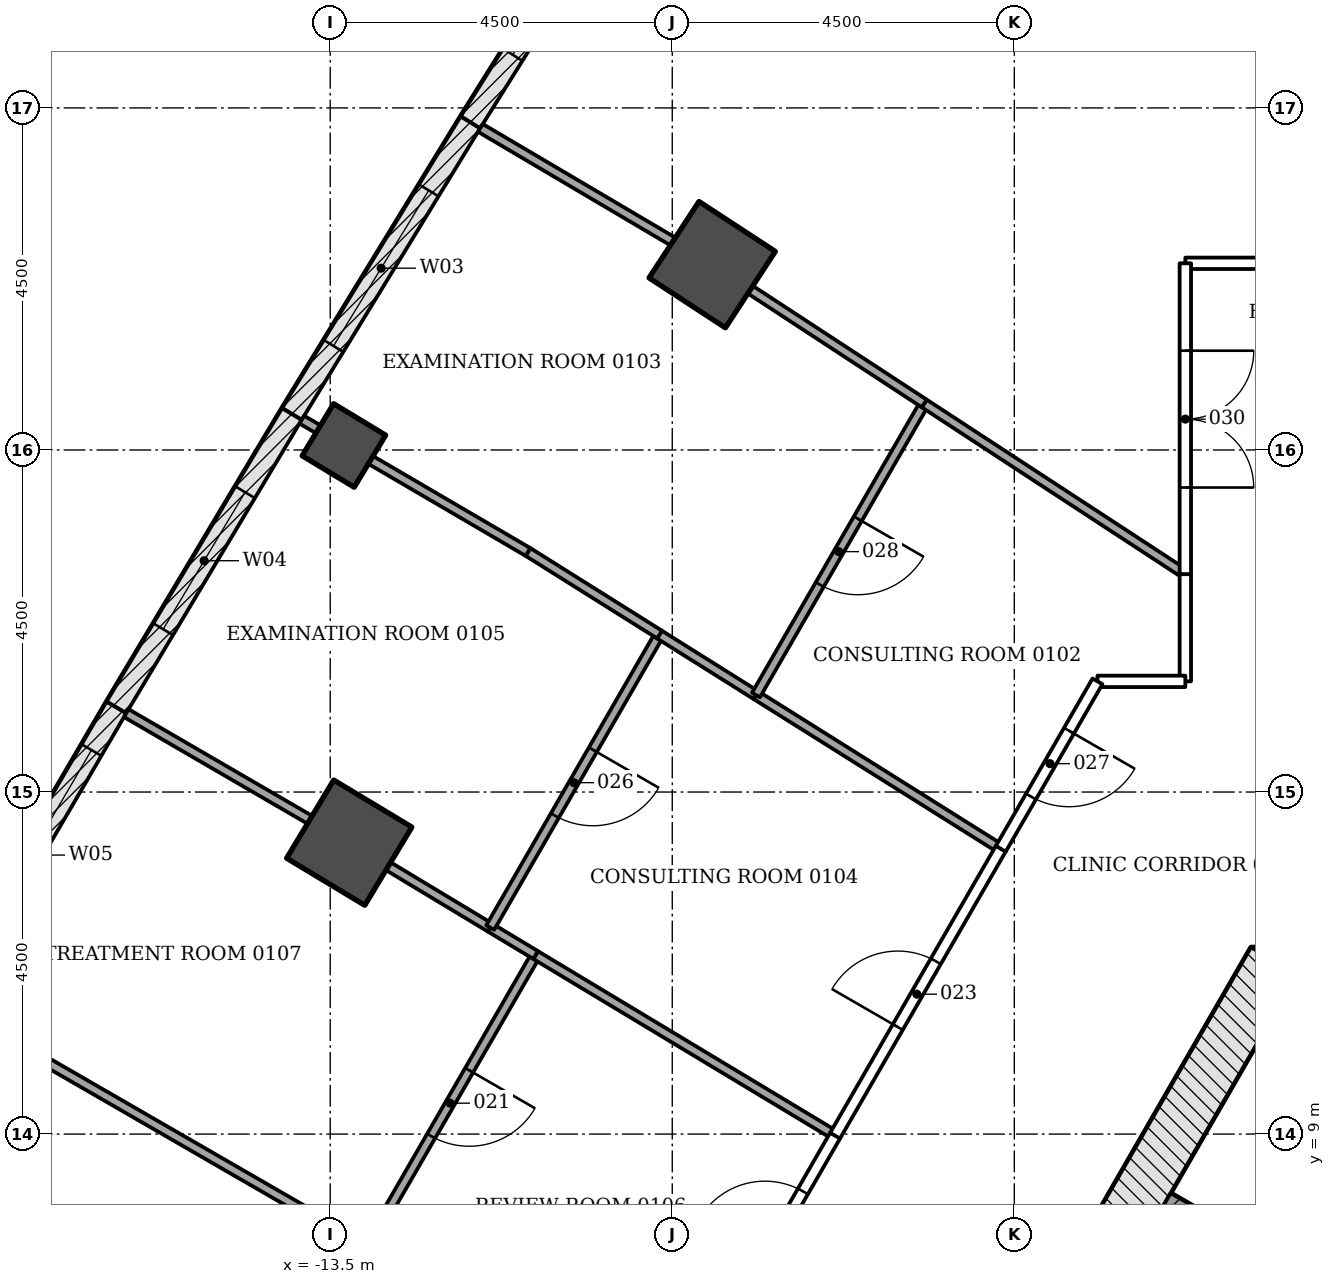
"""IFC4 building model, lengths in metres.
Left out: names, types, materials, properties, quantities, classifications, styles, units other than length and angle.
Written with IfcOpenShell. Run it as: python <this file> out.ifc"""

import sys

from ifc_helpers import new_model, si_unit, direction, frame, frame_2d, origin, origin_2d, place, context, subcontext, project, spatial, rectangle, extrude, element, fill, save


model = new_model("IFC4")
c1 = context("Model", 3, precision=1e-05, world=origin(), true_north=direction((0.0, 1.0)))
c2 = subcontext(c1, "Body", "Model", "MODEL_VIEW")
j1 = project(units=[si_unit("LENGTHUNIT", "METRE"), si_unit("PLANEANGLEUNIT", "RADIAN")], contexts=[c1])
p1 = place(None, origin())
s1 = spatial("IfcSite", under=j1, at=p1, CompositionType="ELEMENT")
p2 = place(p1, origin())
s2 = spatial("IfcBuilding", under=s1, at=p2, CompositionType="ELEMENT")
p3 = place(p2, frame((0.0, 0.0, 6.0)))
s3 = spatial("IfcBuildingStorey", under=s2, at=p3, CompositionType="ELEMENT", Elevation=6.0)
for number, where, z_axis, x_axis in (
    (1, (-8.475, 20.438, -0.25), (0.0, 0.0, 1.0), (-0.837, 0.547, 0.0)),
    (2, (-13.25, 12.834, -0.25), (0.0, 0.0, 1.0), (-0.857, 0.516, 0.0)),
):
    element("IfcColumn", number, at=place(p3, frame(where, z_axis=z_axis, x_axis=x_axis)), inside=s3, PredefinedType="COLUMN", context=c2, shape_type="SweptSolid", body=[
        extrude(rectangle(XDim=1.2, YDim=1.2, at=origin_2d()), origin(), (0.0, 0.0, 1.0), 4.5),
    ])
p4 = place(p3, frame((-13.32, 18.059, -0.25), z_axis=(0.0, 0.0, 1.0), x_axis=(-0.855574189811, 0.517680215702, 0.0)))
e3 = element("IfcColumn", 3, at=p4, inside=s3, PredefinedType="COLUMN", context=c2, shape_type="SweptSolid", body=[
    extrude(rectangle(XDim=0.8, YDim=0.8, at=origin_2d()), origin(), (0.0, 0.0, 1.0), 4.5),
])
p5 = place(p3, frame((1.386, 11.106, -0.25), z_axis=(0.0, 0.0, 1.0), x_axis=(-1.0, 0.0, 0.0)))
e4 = element("IfcWall", 4, at=p5, inside=s3, PredefinedType="SHEAR", context=c2, shape_type="SweptSolid", body=[
    extrude(rectangle(XDim=2.771, YDim=0.7, at=frame_2d((1.386, 0.0))), origin(), (0.0, 0.0, 1.0), 4.5),
])
p6 = place(p3, frame((-1.083, 11.281, -0.25), z_axis=(0.0, 0.0, 1.0), x_axis=(-0.500001446645, -0.866024568562, 0.0)))
e5 = element("IfcWall", 5, at=p6, inside=s3, PredefinedType="SHEAR", context=c2, shape_type="SweptSolid", body=[
    extrude(rectangle(XDim=18.458, YDim=0.7, at=frame_2d((9.229, 0.0))), origin(), (0.0, 0.0, 1.0), 4.5),
])
p7 = place(p6, frame((8.979, 0.0, 0.25)))
e6 = element("IfcOpeningElement", 6, at=p7, cuts=e5, PredefinedType="OPENING", context=c2, shape_type="SweptSolid", body=[
    extrude(rectangle(XDim=1.2, YDim=2.1, at=frame_2d((0.6, 1.05))), frame((0.0, 0.36, 0.0), z_axis=(0.0, -1.0, 0.0), x_axis=(1.0, 0.0, 0.0)), (0.0, 0.0, 1.0), 0.72),
])
p8 = place(p6, frame((11.029, 0.0, 0.25)))
e7 = element("IfcOpeningElement", 7, at=p8, cuts=e5, PredefinedType="OPENING", context=c2, shape_type="SweptSolid", body=[
    extrude(rectangle(XDim=1.2, YDim=2.1, at=frame_2d((0.6, 1.05))), frame((0.0, 0.36, 0.0), z_axis=(0.0, -1.0, 0.0), x_axis=(1.0, 0.0, 0.0)), (0.0, 0.0, 1.0), 0.72),
])
p9 = place(p3, frame((-11.655, 22.311, 0.0), z_axis=(0.0, 0.0, 1.0), x_axis=(0.530804082031, 0.847494558389, 0.0)))
e8 = element("IfcWall", 8, at=p9, inside=s3, PredefinedType="NOTDEFINED", context=c2, shape_type="SweptSolid", body=[
    extrude(rectangle(XDim=4.496, YDim=0.3, at=frame_2d((2.248, 0.0))), origin(), (0.0, 0.0, 1.0), 4.25),
])
p10 = place(p9, frame((1.048, 0.0, 0.9)))
e9 = element("IfcOpeningElement", 9, at=p10, cuts=e8, PredefinedType="OPENING", context=c2, shape_type="SweptSolid", body=[
    extrude(rectangle(XDim=2.4, YDim=2.4, at=frame_2d((1.2, 1.2))), frame((0.0, 0.16, 0.0), z_axis=(0.0, -1.0, 0.0), x_axis=(1.0, 0.0, 0.0)), (0.0, 0.0, 1.0), 0.32),
])
p11 = place(p3, frame((-14.004, 18.475, 0.0), z_axis=(0.0, 0.0, 1.0), x_axis=(0.522078085402, 0.852897691838, 0.0)))
e10 = element("IfcWall", 10, at=p11, inside=s3, PredefinedType="NOTDEFINED", context=c2, shape_type="SweptSolid", body=[
    extrude(rectangle(XDim=4.496, YDim=0.3, at=frame_2d((2.248, 0.0))), origin(), (0.0, 0.0, 1.0), 4.25),
])
p12 = place(p11, frame((1.048, 0.0, 0.9)))
e11 = element("IfcOpeningElement", 11, at=p12, cuts=e10, PredefinedType="OPENING", context=c2, shape_type="SweptSolid", body=[
    extrude(rectangle(XDim=2.4, YDim=2.4, at=frame_2d((1.2, 1.2))), frame((0.0, 0.16, 0.0), z_axis=(0.0, -1.0, 0.0), x_axis=(1.0, 0.0, 0.0)), (0.0, 0.0, 1.0), 0.32),
])
p13 = place(p3, frame((-16.313, 14.614, 0.0), z_axis=(0.0, 0.0, 1.0), x_axis=(0.513257465408, 0.858234684805, 0.0)))
e12 = element("IfcWall", 12, at=p13, inside=s3, PredefinedType="NOTDEFINED", context=c2, shape_type="SweptSolid", body=[
    extrude(rectangle(XDim=4.496, YDim=0.3, at=frame_2d((2.248, 0.0))), origin(), (0.0, 0.0, 1.0), 4.25),
])
p14 = place(p13, frame((1.198, 0.0, 0.8)))
e13 = element("IfcOpeningElement", 13, at=p14, cuts=e12, PredefinedType="OPENING", context=c2, shape_type="SweptSolid", body=[
    extrude(rectangle(XDim=2.1, YDim=3.0, at=frame_2d((1.05, 1.5))), frame((0.0, 0.16, 0.0), z_axis=(0.0, -1.0, 0.0), x_axis=(1.0, 0.0, 0.0)), (0.0, 0.0, 1.0), 0.32),
])
p15 = place(p3, frame((-18.582, 10.73, 0.0), z_axis=(0.0, 0.0, 1.0), x_axis=(0.50445499627, 0.86343798662, 0.0)))
e14 = element("IfcWall", 14, at=p15, inside=s3, PredefinedType="NOTDEFINED", context=c2, shape_type="SweptSolid", body=[
    extrude(rectangle(XDim=4.496, YDim=0.3, at=frame_2d((2.248, 0.0))), origin(), (0.0, 0.0, 1.0), 4.25),
])
p16 = place(p15, frame((0.648, 0.0, 0.8)))
e15 = element("IfcOpeningElement", 15, at=p16, cuts=e14, PredefinedType="OPENING", context=c2, shape_type="SweptSolid", body=[
    extrude(rectangle(XDim=3.2, YDim=2.7, at=frame_2d((1.6, 1.35))), frame((0.0, 0.16, 0.0), z_axis=(0.0, -1.0, 0.0), x_axis=(1.0, 0.0, 0.0)), (0.0, 0.0, 1.0), 0.32),
])
p17 = place(p3, frame((-2.506, 8.115, -0.25), z_axis=(0.0, 0.0, 1.0), x_axis=(0.865996321171, -0.50005036918, 0.0)))
e16 = element("IfcWall", 16, at=p17, inside=s3, PredefinedType="PARTITIONING", context=c2, shape_type="SweptSolid", body=[
    extrude(rectangle(XDim=2.9, YDim=0.25, at=frame_2d((1.45, 0.0))), origin(), (0.0, 0.0, 1.0), 4.5),
])
p18 = place(p3, frame((-13.017, 7.515, 0.0), z_axis=(0.0, 0.0, 1.0), x_axis=(-0.866023771128, 0.500002827834, 0.0)))
e17 = element("IfcWall", 17, at=p18, inside=s3, PredefinedType="PARTITIONING", context=c2, shape_type="SweptSolid", body=[
    extrude(rectangle(XDim=5.226, YDim=0.12, at=frame_2d((2.613, 0.0))), origin(), (0.0, 0.0, 1.0), 3.638),
])
p19 = place(p3, frame((-10.797, 11.355, 0.0), z_axis=(0.0, 0.0, 1.0), x_axis=(-0.500117989508, -0.865957271793, 0.0)))
e18 = element("IfcWall", 18, at=p19, inside=s3, PredefinedType="PARTITIONING", context=c2, shape_type="SweptSolid", body=[
    extrude(rectangle(XDim=4.435, YDim=0.12, at=frame_2d((2.217, 0.0))), origin(), (0.0, 0.0, 1.0), 3.638),
])
p20 = place(p19, frame((1.75, 0.0, 0.0)))
e19 = element("IfcOpeningElement", 19, at=p20, cuts=e18, PredefinedType="OPENING", context=c2, shape_type="SweptSolid", body=[
    extrude(rectangle(XDim=1.0, YDim=2.1, at=frame_2d((0.5, 1.05))), frame((0.0, 0.07, 0.0), z_axis=(0.0, -1.0, 0.0), x_axis=(1.0, 0.0, 0.0)), (0.0, 0.0, 1.0), 0.14),
])
p21 = place(p3, frame((-6.857, 8.983, 0.0), z_axis=(0.0, 0.0, 1.0), x_axis=(-0.856751730158, 0.515729069251, 0.0)))
e20 = element("IfcWall", 20, at=p21, inside=s3, PredefinedType="PARTITIONING", context=c2, shape_type="SweptSolid", body=[
    extrude(rectangle(XDim=4.598, YDim=0.12, at=frame_2d((2.299, 0.0))), origin(), (0.0, 0.0, 1.0), 3.638),
])
p22 = place(p3, frame((-8.256, 6.558, 0.0), z_axis=(0.0, 0.0, 1.0), x_axis=(0.500081734942, 0.86597820895, 0.0)))
e21 = element("IfcWall", 21, at=p22, inside=s3, PredefinedType="PARTITIONING", context=c2, shape_type="SweptSolid", body=[
    extrude(rectangle(XDim=2.804, YDim=0.15, at=frame_2d((1.402, 0.0))), origin(), (0.0, 0.0, 1.0), 3.638),
])
p23 = place(p22, frame((0.95, 0.0, 0.0)))
e22 = element("IfcOpeningElement", 22, at=p23, cuts=e21, PredefinedType="OPENING", context=c2, shape_type="SweptSolid", body=[
    extrude(rectangle(XDim=1.0, YDim=2.1, at=frame_2d((0.5, 1.05))), frame((0.0, 0.085, 0.0), z_axis=(0.0, -1.0, 0.0), x_axis=(1.0, 0.0, 0.0)), (0.0, 0.0, 1.0), 0.17),
])
p24 = place(p3, frame((-10.798, 11.356, 0.0), z_axis=(0.0, 0.0, 1.0), x_axis=(-0.856627537291, 0.515935327686, 0.0)))
e23 = element("IfcWall", 23, at=p24, inside=s3, PredefinedType="PARTITIONING", context=c2, shape_type="SweptSolid", body=[
    extrude(rectangle(XDim=0.698, YDim=0.12, at=frame_2d((0.349, 0.0))), origin(), (0.0, 0.0, 1.0), 3.638),
])
p25 = place(p3, frame((-13.769, 13.135, 0.0), z_axis=(0.0, 0.0, 1.0), x_axis=(-0.864576979504, 0.50250039454, 0.0)))
e24 = element("IfcWall", 24, at=p25, inside=s3, PredefinedType="PARTITIONING", context=c2, shape_type="SweptSolid", body=[
    extrude(rectangle(XDim=2.792, YDim=0.12, at=frame_2d((1.396, 0.0))), origin(), (0.0, 0.0, 1.0), 3.633),
])
p26 = place(p3, frame((-11.397, 11.717, 0.0), z_axis=(0.0, 0.0, 1.0), x_axis=(-0.85652691333, 0.516102360721, 0.0)))
e25 = element("IfcWall", 25, at=p26, inside=s3, PredefinedType="PARTITIONING", context=c2, shape_type="SweptSolid", body=[
    extrude(rectangle(XDim=1.563, YDim=0.12, at=frame_2d((0.782, 0.0))), origin(), (0.0, 0.0, 1.0), 3.638),
])
p27 = place(p3, frame((-6.858, 8.979, 0.0), z_axis=(0.0, 0.0, 1.0), x_axis=(0.500105111742, 0.865964708986, 0.0)))
e26 = element("IfcWall", 26, at=p27, inside=s3, PredefinedType="PARTITIONING", context=c2, shape_type="SweptSolid", body=[
    extrude(rectangle(XDim=4.363, YDim=0.15, at=frame_2d((2.181, 0.0))), origin(), (0.0, 0.0, 1.0), 3.638),
])
p28 = place(p27, frame((1.65, 0.0, 0.0)))
e27 = element("IfcOpeningElement", 27, at=p28, cuts=e26, PredefinedType="OPENING", context=c2, shape_type="SweptSolid", body=[
    extrude(rectangle(XDim=1.0, YDim=2.1, at=frame_2d((0.5, 1.05))), frame((0.0, 0.085, 0.0), z_axis=(0.0, -1.0, 0.0), x_axis=(1.0, 0.0, 0.0)), (0.0, 0.0, 1.0), 0.17),
])
p29 = place(p3, frame((-9.17, 15.572, 0.0), z_axis=(0.0, 0.0, 1.0), x_axis=(-0.499902881486, -0.866081467924, 0.0)))
e28 = element("IfcWall", 28, at=p29, inside=s3, PredefinedType="PARTITIONING", context=c2, shape_type="SweptSolid", body=[
    extrude(rectangle(XDim=4.451, YDim=0.12, at=frame_2d((2.226, 0.0))), origin(), (0.0, 0.0, 1.0), 3.638),
])
p30 = place(p29, frame((1.75, 0.0, 0.0)))
e29 = element("IfcOpeningElement", 29, at=p30, cuts=e28, PredefinedType="OPENING", context=c2, shape_type="SweptSolid", body=[
    extrude(rectangle(XDim=1.0, YDim=2.1, at=frame_2d((0.5, 1.05))), frame((0.0, 0.07, 0.0), z_axis=(0.0, -1.0, 0.0), x_axis=(1.0, 0.0, 0.0)), (0.0, 0.0, 1.0), 0.14),
])
p31 = place(p3, frame((-4.68, 12.753, 0.0), z_axis=(0.0, 0.0, 1.0), x_axis=(-0.846844902979, 0.531839929206, 0.0)))
e30 = element("IfcWall", 30, at=p31, inside=s3, PredefinedType="PARTITIONING", context=c2, shape_type="SweptSolid", body=[
    extrude(rectangle(XDim=3.8, YDim=0.12, at=frame_2d((1.9, 0.0))), origin(), (0.0, 0.0, 1.0), 3.638),
])
p32 = place(p3, frame((-7.901, 14.776, 0.0), z_axis=(0.0, 0.0, 1.0), x_axis=(-0.847002237732, 0.531589323892, 0.0)))
e31 = element("IfcWall", 31, at=p32, inside=s3, PredefinedType="PARTITIONING", context=c2, shape_type="SweptSolid", body=[
    extrude(rectangle(XDim=1.503, YDim=0.12, at=frame_2d((0.751, 0.0))), origin(), (0.0, 0.0, 1.0), 3.638),
])
p33 = place(p3, frame((-2.25, 16.366, 0.0), z_axis=(0.0, 0.0, 1.0), x_axis=(0.0, -1.0, 0.0)))
e32 = element("IfcWall", 32, at=p33, inside=s3, PredefinedType="PARTITIONING", context=c2, shape_type="SweptSolid", body=[
    extrude(rectangle(XDim=1.41, YDim=0.15, at=frame_2d((0.705, 0.0))), origin(), (0.0, 0.0, 1.0), 3.638),
])
p34 = place(p3, frame((-2.25, 14.956, 0.0), z_axis=(0.0, 0.0, 1.0), x_axis=(-1.0, 0.0, 0.0)))
e33 = element("IfcWall", 33, at=p34, inside=s3, PredefinedType="PARTITIONING", context=c2, shape_type="SweptSolid", body=[
    extrude(rectangle(XDim=1.156, YDim=0.15, at=frame_2d((0.578, 0.0))), origin(), (0.0, 0.0, 1.0), 4.25),
])
p35 = place(p3, frame((-3.406, 14.956, 0.0), z_axis=(0.0, 0.0, 1.0), x_axis=(-0.499999364504, -0.866025770688, 0.0)))
e34 = element("IfcWall", 34, at=p35, inside=s3, PredefinedType="PARTITIONING", context=c2, shape_type="SweptSolid", body=[
    extrude(rectangle(XDim=2.544, YDim=0.15, at=frame_2d((1.272, 0.0))), origin(), (0.0, 0.0, 1.0), 3.638),
])
p36 = place(p35, frame((0.75, 0.0, 0.0)))
e35 = element("IfcOpeningElement", 35, at=p36, cuts=e34, PredefinedType="OPENING", context=c2, shape_type="SweptSolid", body=[
    extrude(rectangle(XDim=1.0, YDim=2.1, at=frame_2d((0.5, 1.05))), frame((0.0, 0.085, 0.0), z_axis=(0.0, -1.0, 0.0), x_axis=(1.0, 0.0, 0.0)), (0.0, 0.0, 1.0), 0.17),
])
p37 = place(p3, frame((-0.45, 20.456, 0.0), z_axis=(0.0, 0.0, 1.0), x_axis=(-1.0, 0.0, 0.0)))
e36 = element("IfcWall", 36, at=p37, inside=s3, PredefinedType="PARTITIONING", context=c2, shape_type="SweptSolid", body=[
    extrude(rectangle(XDim=1.8, YDim=0.15, at=frame_2d((0.9, 0.0))), origin(), (0.0, 0.0, 1.0), 3.638),
])
p38 = place(p3, frame((-2.25, 20.456, 0.0), z_axis=(0.0, 0.0, 1.0), x_axis=(0.0, -1.0, 0.0)))
e37 = element("IfcWall", 37, at=p38, inside=s3, PredefinedType="PARTITIONING", context=c2, shape_type="SweptSolid", body=[
    extrude(rectangle(XDim=4.089, YDim=0.15, at=frame_2d((2.044, 0.0))), origin(), (0.0, 0.0, 1.0), 3.638),
])
p39 = place(p38, frame((1.15, 0.0, 0.0)))
e38 = element("IfcOpeningElement", 38, at=p39, cuts=e37, PredefinedType="OPENING", context=c2, shape_type="SweptSolid", body=[
    extrude(rectangle(XDim=1.8, YDim=2.1, at=frame_2d((0.9, 1.05))), frame((0.0, 0.085, 0.0), z_axis=(0.0, -1.0, 0.0), x_axis=(1.0, 0.0, 0.0)), (0.0, 0.0, 1.0), 0.17),
])
p40 = place(p3, frame((-13.658, 18.273, 0.0), z_axis=(0.0, 0.0, 1.0), x_axis=(-0.863885093979, 0.503688936151, 0.0)))
e39 = element("IfcWall", 39, at=p40, inside=s3, PredefinedType="PARTITIONING", context=c2, shape_type="SweptSolid", body=[
    extrude(rectangle(XDim=0.25, YDim=0.12, at=frame_2d((0.125, 0.0))), origin(), (0.0, 0.0, 1.0), 4.25),
])
p41 = place(p3, frame((-9.166, 15.571, 0.0), z_axis=(0.0, 0.0, 1.0), x_axis=(-0.84701751501, 0.531564981227, 0.0)))
e40 = element("IfcWall", 40, at=p41, inside=s3, PredefinedType="PARTITIONING", context=c2, shape_type="SweptSolid", body=[
    extrude(rectangle(XDim=2.045, YDim=0.12, at=frame_2d((1.022, 0.0))), origin(), (0.0, 0.0, 1.0), 3.638),
])
p42 = place(p3, frame((-10.898, 16.658, 0.0), z_axis=(0.0, 0.0, 1.0), x_axis=(-0.863161652457, 0.504927679701, 0.0)))
e41 = element("IfcWall", 41, at=p42, inside=s3, PredefinedType="PARTITIONING", context=c2, shape_type="SweptSolid", body=[
    extrude(rectangle(XDim=2.398, YDim=0.12, at=frame_2d((1.199, 0.0))), origin(), (0.0, 0.0, 1.0), 3.638),
])
p43 = place(p3, frame((-5.684, 18.611, 0.0), z_axis=(0.0, 0.0, 1.0), x_axis=(-0.500099413844, -0.865967999567, 0.0)))
e42 = element("IfcWall", 42, at=p43, inside=s3, PredefinedType="PARTITIONING", context=c2, shape_type="SweptSolid", body=[
    extrude(rectangle(XDim=4.429, YDim=0.12, at=frame_2d((2.214, 0.0))), origin(), (0.0, 0.0, 1.0), 3.638),
])
p44 = place(p43, frame((1.75, 0.0, 0.0)))
e43 = element("IfcOpeningElement", 43, at=p44, cuts=e42, PredefinedType="OPENING", context=c2, shape_type="SweptSolid", body=[
    extrude(rectangle(XDim=1.0, YDim=2.1, at=frame_2d((0.5, 1.05))), frame((0.0, 0.07, 0.0), z_axis=(0.0, -1.0, 0.0), x_axis=(1.0, 0.0, 0.0)), (0.0, 0.0, 1.0), 0.14),
])
p45 = place(p3, frame((-2.252, 16.367, 0.0), z_axis=(0.0, 0.0, 1.0), x_axis=(-0.836925574982, 0.547316710819, 0.0)))
e44 = element("IfcWall", 44, at=p45, inside=s3, PredefinedType="PARTITIONING", context=c2, shape_type="SweptSolid", body=[
    extrude(rectangle(XDim=4.102, YDim=0.12, at=frame_2d((2.051, 0.0))), origin(), (0.0, 0.0, 1.0), 3.638),
])
p46 = place(p3, frame((-8.992, 20.743, 0.0), z_axis=(0.0, 0.0, 1.0), x_axis=(-0.861228913487, 0.508217235613, 0.0)))
e45 = element("IfcWall", 45, at=p46, inside=s3, PredefinedType="PARTITIONING", context=c2, shape_type="SweptSolid", body=[
    extrude(rectangle(XDim=2.94, YDim=0.12, at=frame_2d((1.47, 0.0))), origin(), (0.0, 0.0, 1.0), 3.633),
])
p47 = place(p3, frame((-5.685, 18.612, 0.0), z_axis=(0.0, 0.0, 1.0), x_axis=(-0.836813840242, 0.547487531163, 0.0)))
e46 = element("IfcWall", 46, at=p47, inside=s3, PredefinedType="PARTITIONING", context=c2, shape_type="SweptSolid", body=[
    extrude(rectangle(XDim=2.734, YDim=0.12, at=frame_2d((1.367, 0.0))), origin(), (0.0, 0.0, 1.0), 3.638),
])
p48 = place(p10, origin())
e47 = element("IfcWindow", 47, at=p48, inside=s3, PartitioningType="DOUBLE_PANEL_VERTICAL", PredefinedType="WINDOW", context=c2, shape_type="SweptSolid", body=[
    extrude(rectangle(XDim=2.4, YDim=2.4, at=frame_2d((1.2, 1.2))), frame((0.0, 0.03, 0.0), z_axis=(0.0, -1.0, 0.0), x_axis=(1.0, 0.0, 0.0)), (0.0, 0.0, 1.0), 0.06),
])
fill(e9, e47)
p49 = place(p12, origin())
e48 = element("IfcWindow", 48, at=p49, inside=s3, PartitioningType="DOUBLE_PANEL_VERTICAL", PredefinedType="WINDOW", context=c2, shape_type="SweptSolid", body=[
    extrude(rectangle(XDim=2.4, YDim=2.4, at=frame_2d((1.2, 1.2))), frame((0.0, 0.03, 0.0), z_axis=(0.0, -1.0, 0.0), x_axis=(1.0, 0.0, 0.0)), (0.0, 0.0, 1.0), 0.06),
])
fill(e11, e48)
p50 = place(p14, origin())
e49 = element("IfcWindow", 49, at=p50, inside=s3, PartitioningType="DOUBLE_PANEL_HORIZONTAL", PredefinedType="WINDOW", context=c2, shape_type="SweptSolid", body=[
    extrude(rectangle(XDim=2.1, YDim=3.0, at=frame_2d((1.05, 1.5))), frame((0.0, 0.03, 0.0), z_axis=(0.0, -1.0, 0.0), x_axis=(1.0, 0.0, 0.0)), (0.0, 0.0, 1.0), 0.06),
])
fill(e13, e49)
p51 = place(p16, origin())
e50 = element("IfcWindow", 50, at=p51, inside=s3, PartitioningType="TRIPLE_PANEL_VERTICAL", PredefinedType="WINDOW", context=c2, shape_type="SweptSolid", body=[
    extrude(rectangle(XDim=3.2, YDim=2.7, at=frame_2d((1.6, 1.35))), frame((0.0, 0.03, 0.0), z_axis=(0.0, -1.0, 0.0), x_axis=(1.0, 0.0, 0.0)), (0.0, 0.0, 1.0), 0.06),
])
fill(e15, e50)
p52 = place(p23, origin())
e51 = element("IfcDoor", 51, at=p52, inside=s3, OperationType="SINGLE_SWING_RIGHT", PredefinedType="DOOR", context=c2, shape_type="SweptSolid", body=[
    extrude(rectangle(XDim=1.0, YDim=2.1, at=frame_2d((0.5, 1.05))), frame((0.0, 0.025, 0.0), z_axis=(0.0, -1.0, 0.0), x_axis=(1.0, 0.0, 0.0)), (0.0, 0.0, 1.0), 0.05),
])
fill(e22, e51)
p53 = place(p20, origin())
e52 = element("IfcDoor", 52, at=p53, inside=s3, OperationType="SINGLE_SWING_LEFT", PredefinedType="DOOR", context=c2, shape_type="SweptSolid", body=[
    extrude(rectangle(XDim=1.0, YDim=2.1, at=frame_2d((0.5, 1.05))), frame((0.0, 0.025, 0.0), z_axis=(0.0, -1.0, 0.0), x_axis=(1.0, 0.0, 0.0)), (0.0, 0.0, 1.0), 0.05),
])
fill(e19, e52)
p54 = place(p28, origin())
e53 = element("IfcDoor", 53, at=p54, inside=s3, OperationType="SINGLE_SWING_LEFT", PredefinedType="DOOR", context=c2, shape_type="SweptSolid", body=[
    extrude(rectangle(XDim=1.0, YDim=2.1, at=frame_2d((0.5, 1.05))), frame((0.0, 0.025, 0.0), z_axis=(0.0, -1.0, 0.0), x_axis=(1.0, 0.0, 0.0)), (0.0, 0.0, 1.0), 0.05),
])
fill(e27, e53)
p55 = place(p30, origin())
e54 = element("IfcDoor", 54, at=p55, inside=s3, OperationType="SINGLE_SWING_LEFT", PredefinedType="DOOR", context=c2, shape_type="SweptSolid", body=[
    extrude(rectangle(XDim=1.0, YDim=2.1, at=frame_2d((0.5, 1.05))), frame((0.0, 0.025, 0.0), z_axis=(0.0, -1.0, 0.0), x_axis=(1.0, 0.0, 0.0)), (0.0, 0.0, 1.0), 0.05),
])
fill(e29, e54)
p56 = place(p36, origin())
e55 = element("IfcDoor", 55, at=p56, inside=s3, OperationType="SINGLE_SWING_RIGHT", PredefinedType="DOOR", context=c2, shape_type="SweptSolid", body=[
    extrude(rectangle(XDim=1.0, YDim=2.1, at=frame_2d((0.5, 1.05))), frame((0.0, 0.025, 0.0), z_axis=(0.0, -1.0, 0.0), x_axis=(1.0, 0.0, 0.0)), (0.0, 0.0, 1.0), 0.05),
])
fill(e35, e55)
p57 = place(p44, origin())
e56 = element("IfcDoor", 56, at=p57, inside=s3, OperationType="SINGLE_SWING_LEFT", PredefinedType="DOOR", context=c2, shape_type="SweptSolid", body=[
    extrude(rectangle(XDim=1.0, YDim=2.1, at=frame_2d((0.5, 1.05))), frame((0.0, 0.025, 0.0), z_axis=(0.0, -1.0, 0.0), x_axis=(1.0, 0.0, 0.0)), (0.0, 0.0, 1.0), 0.05),
])
fill(e43, e56)
p58 = place(p39, origin())
e57 = element("IfcDoor", 57, at=p58, inside=s3, OperationType="DOUBLE_DOOR_SINGLE_SWING", PredefinedType="DOOR", context=c2, shape_type="SweptSolid", body=[
    extrude(rectangle(XDim=1.8, YDim=2.1, at=frame_2d((0.9, 1.05))), frame((0.0, 0.025, 0.0), z_axis=(0.0, -1.0, 0.0), x_axis=(1.0, 0.0, 0.0)), (0.0, 0.0, 1.0), 0.05),
])
fill(e38, e57)
save(model, sys.argv[1])
